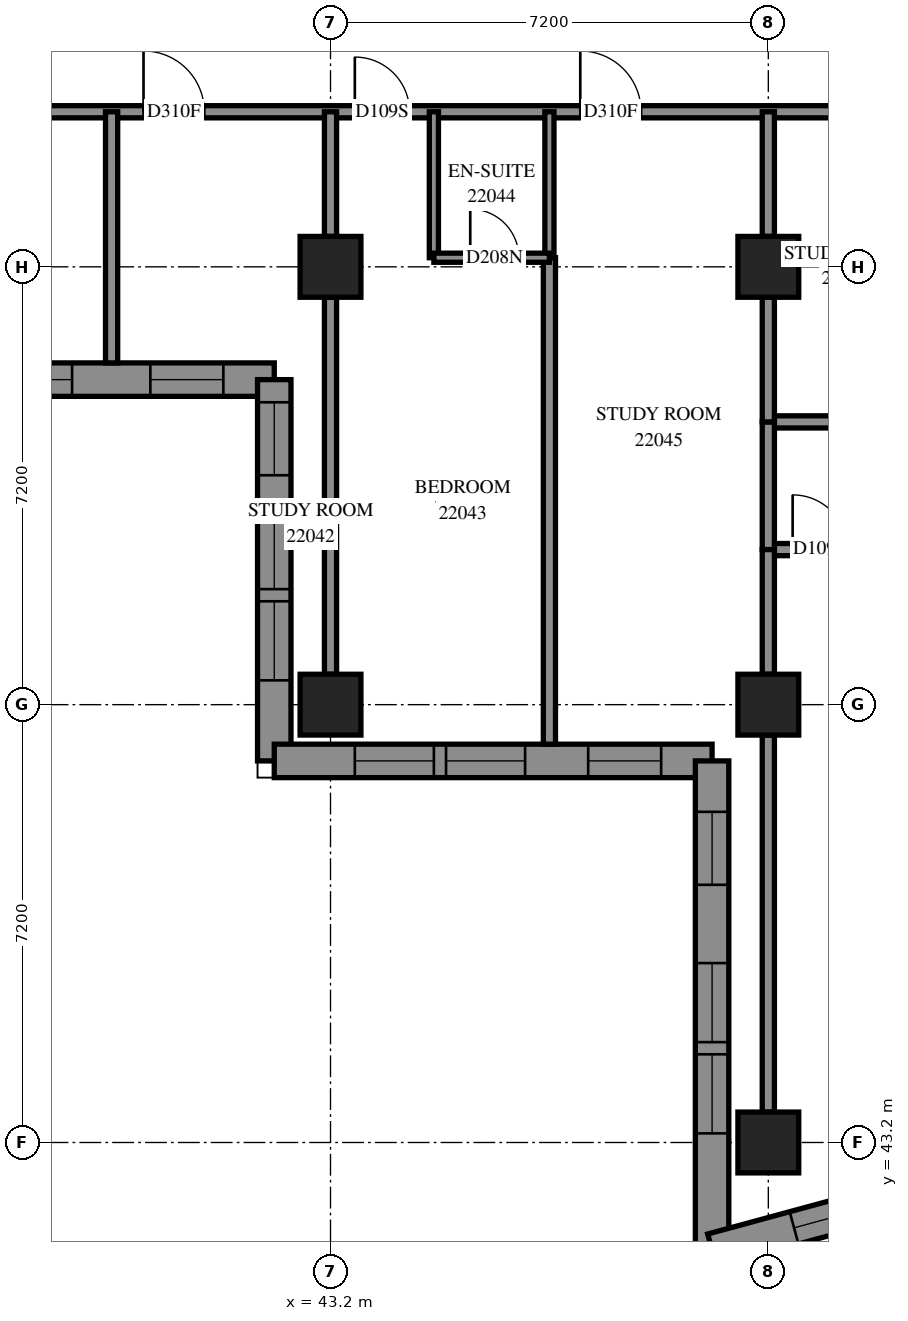
"""IFC4 building model, lengths in metres.
Left out: names, types, materials, properties, quantities, classifications, styles, units other than length and angle.
Written with IfcOpenShell. Run it as: python <this file> out.ifc"""

import sys

from ifc_helpers import new_model, si_unit, direction, frame, frame_2d, origin, origin_2d, place, context, subcontext, project, spatial, polyline, rectangle, outline, extrude, element, fill, save


model = new_model("IFC4")
c1 = context("Model", 3, precision=1e-05, world=origin(), true_north=direction((0.0, 1.0)))
c2 = subcontext(c1, "Body", "Model", "MODEL_VIEW")
j1 = project(units=[si_unit("LENGTHUNIT", "METRE"), si_unit("PLANEANGLEUNIT", "RADIAN")], contexts=[c1])
p1 = place(None, origin())
s1 = spatial("IfcSite", under=j1, at=p1, CompositionType="ELEMENT")
p2 = place(p1, origin())
s2 = spatial("IfcBuilding", under=s1, at=p2, CompositionType="ELEMENT")
p3 = place(p2, frame((0.0, 0.0, 84.6)))
s3 = spatial("IfcBuildingStorey", under=s2, at=p3, CompositionType="ELEMENT", Elevation=84.6)
for number, where, z_axis, x_axis in (
    (1, (43.2, 50.4, 0.0), (0.0, 0.0, 1.0), (1.0, 0.0, 0.0)),
    (2, (43.2, 57.6, 0.0), (0.0, 0.0, 1.0), (1.0, 0.0, 0.0)),
    (3, (50.4, 43.2, 0.0), (0.0, 0.0, 1.0), (1.0, 0.0, 0.0)),
    (4, (50.4, 50.4, 0.0), (0.0, 0.0, 1.0), (1.0, 0.0, 0.0)),
    (5, (50.4, 57.6, 0.0), (0.0, 0.0, 1.0), (1.0, 0.0, 0.0)),
):
    element("IfcColumn", number, at=place(p3, frame(where, z_axis=z_axis, x_axis=x_axis)), inside=s3, PredefinedType="COLUMN", context=c2, shape_type="SweptSolid", body=[
        extrude(rectangle(XDim=1.0, YDim=1.0, at=origin_2d()), origin(), (0.0, 0.0, 1.0), 3.1),
    ])
p4 = place(p3, frame((27.875, 55.745, 0.0), z_axis=(0.0, 0.0, 1.0), x_axis=(1.0, 0.0, 0.0)))
e6 = element("IfcWall", 6, at=p4, inside=s3, PredefinedType="SOLIDWALL", context=c2, shape_type="SweptSolid", body=[
    extrude(outline(polyline([(-0.275, -0.275), (14.125, -0.275), (14.675, 0.275), (0.275, 0.275), (-0.275, -0.275)])), origin(), (0.0, 0.0, 1.0), 3.1),
])
p5 = place(p4, frame((1.175, 0.0, 0.5)))
e7 = element("IfcOpeningElement", 7, at=p5, cuts=e6, PredefinedType="OPENING", context=c2, shape_type="SweptSolid", body=[
    extrude(rectangle(XDim=1.3, YDim=2.45, at=frame_2d((0.65, 1.225))), frame((0.0, 0.285, 0.0), z_axis=(0.0, -1.0, 0.0), x_axis=(1.0, 0.0, 0.0)), (0.0, 0.0, 1.0), 0.57),
])
p6 = place(p4, frame((2.675, 0.0, 0.5)))
e8 = element("IfcOpeningElement", 8, at=p6, cuts=e6, PredefinedType="OPENING", context=c2, shape_type="SweptSolid", body=[
    extrude(rectangle(XDim=1.3, YDim=2.45, at=frame_2d((0.65, 1.225))), frame((0.0, 0.285, 0.0), z_axis=(0.0, -1.0, 0.0), x_axis=(1.0, 0.0, 0.0)), (0.0, 0.0, 1.0), 0.57),
])
p7 = place(p4, frame((4.925, 0.0, 0.5)))
e9 = element("IfcOpeningElement", 9, at=p7, cuts=e6, PredefinedType="OPENING", context=c2, shape_type="SweptSolid", body=[
    extrude(rectangle(XDim=1.3, YDim=2.45, at=frame_2d((0.65, 1.225))), frame((0.0, 0.285, 0.0), z_axis=(0.0, -1.0, 0.0), x_axis=(1.0, 0.0, 0.0)), (0.0, 0.0, 1.0), 0.57),
])
p8 = place(p4, frame((6.425, 0.0, 0.5)))
e10 = element("IfcOpeningElement", 10, at=p8, cuts=e6, PredefinedType="OPENING", context=c2, shape_type="SweptSolid", body=[
    extrude(rectangle(XDim=1.3, YDim=2.45, at=frame_2d((0.65, 1.225))), frame((0.0, 0.285, 0.0), z_axis=(0.0, -1.0, 0.0), x_axis=(1.0, 0.0, 0.0)), (0.0, 0.0, 1.0), 0.57),
])
p9 = place(p4, frame((8.275, 0.0, 0.5)))
e11 = element("IfcOpeningElement", 11, at=p9, cuts=e6, PredefinedType="OPENING", context=c2, shape_type="SweptSolid", body=[
    extrude(rectangle(XDim=1.3, YDim=2.45, at=frame_2d((0.65, 1.225))), frame((0.0, 0.285, 0.0), z_axis=(0.0, -1.0, 0.0), x_axis=(1.0, 0.0, 0.0)), (0.0, 0.0, 1.0), 0.57),
])
p10 = place(p4, frame((9.775, 0.0, 0.5)))
e12 = element("IfcOpeningElement", 12, at=p10, cuts=e6, PredefinedType="OPENING", context=c2, shape_type="SweptSolid", body=[
    extrude(rectangle(XDim=1.3, YDim=2.45, at=frame_2d((0.65, 1.225))), frame((0.0, 0.285, 0.0), z_axis=(0.0, -1.0, 0.0), x_axis=(1.0, 0.0, 0.0)), (0.0, 0.0, 1.0), 0.57),
])
p11 = place(p4, frame((12.363, 0.0, 0.5)))
e13 = element("IfcOpeningElement", 13, at=p11, cuts=e6, PredefinedType="OPENING", context=c2, shape_type="SweptSolid", body=[
    extrude(rectangle(XDim=1.2, YDim=2.45, at=frame_2d((0.6, 1.225))), frame((0.0, 0.285, 0.0), z_axis=(0.0, -1.0, 0.0), x_axis=(1.0, 0.0, 0.0)), (0.0, 0.0, 1.0), 0.57),
])
p12 = place(p3, frame((42.275, 55.745, 0.0), z_axis=(0.0, 0.0, 1.0), x_axis=(0.0, -1.0, 0.0)))
e14 = element("IfcWall", 14, at=p12, inside=s3, PredefinedType="SOLIDWALL", context=c2, shape_type="SweptSolid", body=[
    extrude(outline(polyline([(0.275, -0.275), (6.545, -0.275), (5.995, 0.275), (-0.275, 0.275), (0.275, -0.275)])), origin(), (0.0, 0.0, 1.0), 3.1),
])
p13 = place(p12, frame((2.145, 0.0, 0.5)))
e15 = element("IfcOpeningElement", 15, at=p13, cuts=e14, PredefinedType="OPENING", context=c2, shape_type="SweptSolid", body=[
    extrude(rectangle(XDim=1.3, YDim=2.45, at=frame_2d((0.65, 1.225))), frame((0.0, 0.285, 0.0), z_axis=(0.0, -1.0, 0.0), x_axis=(1.0, 0.0, 0.0)), (0.0, 0.0, 1.0), 0.57),
])
p14 = place(p12, frame((3.645, 0.0, 0.5)))
e16 = element("IfcOpeningElement", 16, at=p14, cuts=e14, PredefinedType="OPENING", context=c2, shape_type="SweptSolid", body=[
    extrude(rectangle(XDim=1.3, YDim=2.45, at=frame_2d((0.65, 1.225))), frame((0.0, 0.285, 0.0), z_axis=(0.0, -1.0, 0.0), x_axis=(1.0, 0.0, 0.0)), (0.0, 0.0, 1.0), 0.57),
])
p15 = place(p12, frame((0.372, 0.0, 0.5)))
e17 = element("IfcOpeningElement", 17, at=p15, cuts=e14, PredefinedType="OPENING", context=c2, shape_type="SweptSolid", body=[
    extrude(rectangle(XDim=1.2, YDim=2.45, at=frame_2d((0.6, 1.225))), frame((0.0, 0.285, 0.0), z_axis=(0.0, -1.0, 0.0), x_axis=(1.0, 0.0, 0.0)), (0.0, 0.0, 1.0), 0.57),
])
p16 = place(p3, frame((42.275, 49.475, 0.0), z_axis=(0.0, 0.0, 1.0), x_axis=(1.0, 0.0, 0.0)))
e18 = element("IfcWall", 18, at=p16, inside=s3, PredefinedType="SOLIDWALL", context=c2, shape_type="SweptSolid", body=[
    extrude(outline(polyline([(-0.275, -0.275), (6.925, -0.275), (7.475, 0.275), (0.275, 0.275), (-0.275, -0.275)])), origin(), (0.0, 0.0, 1.0), 3.1),
])
p17 = place(p16, frame((1.325, 0.0, 0.5)))
e19 = element("IfcOpeningElement", 19, at=p17, cuts=e18, PredefinedType="OPENING", context=c2, shape_type="SweptSolid", body=[
    extrude(rectangle(XDim=1.3, YDim=2.45, at=frame_2d((0.65, 1.225))), frame((0.0, 0.285, 0.0), z_axis=(0.0, -1.0, 0.0), x_axis=(1.0, 0.0, 0.0)), (0.0, 0.0, 1.0), 0.57),
])
p18 = place(p16, frame((2.825, 0.0, 0.5)))
e20 = element("IfcOpeningElement", 20, at=p18, cuts=e18, PredefinedType="OPENING", context=c2, shape_type="SweptSolid", body=[
    extrude(rectangle(XDim=1.3, YDim=2.45, at=frame_2d((0.65, 1.225))), frame((0.0, 0.285, 0.0), z_axis=(0.0, -1.0, 0.0), x_axis=(1.0, 0.0, 0.0)), (0.0, 0.0, 1.0), 0.57),
])
p19 = place(p16, frame((5.162, 0.0, 0.5)))
e21 = element("IfcOpeningElement", 21, at=p19, cuts=e18, PredefinedType="OPENING", context=c2, shape_type="SweptSolid", body=[
    extrude(rectangle(XDim=1.2, YDim=2.45, at=frame_2d((0.6, 1.225))), frame((0.0, 0.285, 0.0), z_axis=(0.0, -1.0, 0.0), x_axis=(1.0, 0.0, 0.0)), (0.0, 0.0, 1.0), 0.57),
])
p20 = place(p3, frame((49.475, 49.475, 0.0), z_axis=(0.0, 0.0, 1.0), x_axis=(0.0, -1.0, 0.0)))
e22 = element("IfcWall", 22, at=p20, inside=s3, PredefinedType="SOLIDWALL", context=c2, shape_type="SweptSolid", body=[
    extrude(outline(polyline([(0.275, -0.275), (8.405, -0.275), (7.686, 0.275), (-0.275, 0.275), (0.275, -0.275)])), origin(), (0.0, 0.0, 1.0), 3.1),
])
p21 = place(p20, frame((3.325, 0.0, 0.5)))
e23 = element("IfcOpeningElement", 23, at=p21, cuts=e22, PredefinedType="OPENING", context=c2, shape_type="SweptSolid", body=[
    extrude(rectangle(XDim=1.3, YDim=2.45, at=frame_2d((0.65, 1.225))), frame((0.0, 0.285, 0.0), z_axis=(0.0, -1.0, 0.0), x_axis=(1.0, 0.0, 0.0)), (0.0, 0.0, 1.0), 0.57),
])
p22 = place(p20, frame((4.825, 0.0, 0.5)))
e24 = element("IfcOpeningElement", 24, at=p22, cuts=e22, PredefinedType="OPENING", context=c2, shape_type="SweptSolid", body=[
    extrude(rectangle(XDim=1.3, YDim=2.45, at=frame_2d((0.65, 1.225))), frame((0.0, 0.285, 0.0), z_axis=(0.0, -1.0, 0.0), x_axis=(1.0, 0.0, 0.0)), (0.0, 0.0, 1.0), 0.57),
])
p23 = place(p20, frame((0.838, 0.0, 0.5)))
e25 = element("IfcOpeningElement", 25, at=p23, cuts=e22, PredefinedType="OPENING", context=c2, shape_type="SweptSolid", body=[
    extrude(rectangle(XDim=1.2, YDim=2.45, at=frame_2d((0.6, 1.225))), frame((0.0, 0.285, 0.0), z_axis=(0.0, -1.0, 0.0), x_axis=(1.0, 0.0, 0.0)), (0.0, 0.0, 1.0), 0.57),
])
p24 = place(p3, frame((49.475, 41.43, 0.0), z_axis=(0.0, 0.0, 1.0), x_axis=(0.9649788617, 0.262327651, 0.0)))
e26 = element("IfcWall", 26, at=p24, inside=s3, PredefinedType="SOLIDWALL", context=c2, shape_type="SweptSolid", body=[
    extrude(outline(polyline([(-0.36, -0.275), (3.186, -0.275), (3.286, 0.275), (0.36, 0.275), (-0.36, -0.275)])), origin(), (0.0, 0.0, 1.0), 3.1),
])
p25 = place(p24, frame((1.397, 0.0, 0.5)))
e27 = element("IfcOpeningElement", 27, at=p25, cuts=e26, PredefinedType="OPENING", context=c2, shape_type="SweptSolid", body=[
    extrude(rectangle(XDim=1.2, YDim=2.45, at=frame_2d((0.6, 1.225))), frame((0.0, 0.285, 0.0), z_axis=(0.0, -1.0, 0.0), x_axis=(1.0, 0.0, 0.0)), (0.0, 0.0, 1.0), 0.57),
])
p26 = place(p3, frame((28.8, 60.15, 0.0), z_axis=(0.0, 0.0, 1.0), x_axis=(1.0, 0.0, 0.0)))
e28 = element("IfcWall", 28, at=p26, inside=s3, PredefinedType="PARTITIONING", context=c2, shape_type="SweptSolid", body=[
    extrude(rectangle(XDim=24.15, YDim=0.2, at=frame_2d((12.075, 0.0))), origin(), (0.0, 0.0, 1.0), 3.1),
])
p27 = place(p26, frame((11.325, 0.0, 0.0)))
e29 = element("IfcOpeningElement", 29, at=p27, cuts=e28, PredefinedType="OPENING", context=c2, shape_type="SweptSolid", body=[
    extrude(rectangle(XDim=1.0, YDim=2.1, at=frame_2d((0.5, 1.05))), frame((0.0, 0.11, 0.0), z_axis=(0.0, -1.0, 0.0), x_axis=(1.0, 0.0, 0.0)), (0.0, 0.0, 1.0), 0.22),
])
p28 = place(p26, frame((14.8, 0.0, 0.0)))
e30 = element("IfcOpeningElement", 30, at=p28, cuts=e28, PredefinedType="OPENING", context=c2, shape_type="SweptSolid", body=[
    extrude(rectangle(XDim=0.9, YDim=2.1, at=frame_2d((0.45, 1.05))), frame((0.0, 0.11, 0.0), z_axis=(0.0, -1.0, 0.0), x_axis=(1.0, 0.0, 0.0)), (0.0, 0.0, 1.0), 0.22),
])
p29 = place(p26, frame((18.508, 0.0, 0.0)))
e31 = element("IfcOpeningElement", 31, at=p29, cuts=e28, PredefinedType="OPENING", context=c2, shape_type="SweptSolid", body=[
    extrude(rectangle(XDim=1.0, YDim=2.1, at=frame_2d((0.5, 1.05))), frame((0.0, 0.11, 0.0), z_axis=(0.0, -1.0, 0.0), x_axis=(1.0, 0.0, 0.0)), (0.0, 0.0, 1.0), 0.22),
])
p30 = place(p26, frame((22.882, 0.0, 0.0)))
e32 = element("IfcOpeningElement", 32, at=p30, cuts=e28, PredefinedType="OPENING", context=c2, shape_type="SweptSolid", body=[
    extrude(rectangle(XDim=1.0, YDim=2.1, at=frame_2d((0.5, 1.05))), frame((0.0, 0.11, 0.0), z_axis=(0.0, -1.0, 0.0), x_axis=(1.0, 0.0, 0.0)), (0.0, 0.0, 1.0), 0.22),
])
p31 = place(p3, frame((46.8, 49.75, 0.0), z_axis=(0.0, 0.0, 1.0), x_axis=(0.0, 1.0, 0.0)))
e33 = element("IfcWall", 33, at=p31, inside=s3, PredefinedType="PARTITIONING", context=c2, shape_type="SweptSolid", body=[
    extrude(rectangle(XDim=8.0, YDim=0.2, at=frame_2d((4.0, 0.0))), origin(), (0.0, 0.0, 1.0), 3.1),
])
for number, where, z_axis, x_axis in (
    (34, (43.2, 50.9, 0.0), (0.0, 0.0, 1.0), (0.0, 1.0, 0.0)),
    (35, (50.4, 43.7, 0.0), (0.0, 0.0, 1.0), (0.0, 1.0, 0.0)),
):
    element("IfcWall", number, at=place(p3, frame(where, z_axis=z_axis, x_axis=x_axis)), inside=s3, PredefinedType="PARTITIONING", context=c2, shape_type="SweptSolid", body=[
        extrude(rectangle(XDim=6.2, YDim=0.2, at=frame_2d((3.1, 0.0))), origin(), (0.0, 0.0, 1.0), 2.6),
    ])
p32 = place(p3, frame((50.4, 52.95, 0.0), z_axis=(0.0, 0.0, 1.0), x_axis=(1.0, 0.0, 0.0)))
e36 = element("IfcWall", 36, at=p32, inside=s3, PredefinedType="PARTITIONING", context=c2, shape_type="SweptSolid", body=[
    extrude(rectangle(XDim=4.9, YDim=0.2, at=frame_2d((2.45, 0.0))), origin(), (0.0, 0.0, 1.0), 3.1),
])
p33 = place(p32, frame((0.4, 0.0, 0.0)))
e37 = element("IfcOpeningElement", 37, at=p33, cuts=e36, PredefinedType="OPENING", context=c2, shape_type="SweptSolid", body=[
    extrude(rectangle(XDim=0.9, YDim=2.1, at=frame_2d((0.45, 1.05))), frame((0.0, 0.11, 0.0), z_axis=(0.0, -1.0, 0.0), x_axis=(1.0, 0.0, 0.0)), (0.0, 0.0, 1.0), 0.22),
])
p34 = place(p3, frame((39.6, 56.02, 0.0), z_axis=(0.0, 0.0, 1.0), x_axis=(0.0, 1.0, 0.0)))
e38 = element("IfcWall", 38, at=p34, inside=s3, PredefinedType="PARTITIONING", context=c2, shape_type="SweptSolid", body=[
    extrude(rectangle(XDim=4.13, YDim=0.2, at=frame_2d((2.065, 0.0))), origin(), (0.0, 0.0, 1.0), 3.1),
])
p35 = place(p3, frame((50.4, 55.05, 0.0), z_axis=(0.0, 0.0, 1.0), x_axis=(1.0, 0.0, 0.0)))
e39 = element("IfcWall", 39, at=p35, inside=s3, PredefinedType="PARTITIONING", context=c2, shape_type="SweptSolid", body=[
    extrude(rectangle(XDim=2.55, YDim=0.2, at=frame_2d((1.275, 0.0))), origin(), (0.0, 0.0, 1.0), 3.1),
])
for number, where, z_axis, x_axis in (
    (40, (44.9, 57.75, 0.0), (0.0, 0.0, 1.0), (0.0, 1.0, 0.0)),
    (41, (46.8, 57.75, 0.0), (0.0, 0.0, 1.0), (0.0, 1.0, 0.0)),
):
    element("IfcWall", number, at=place(p3, frame(where, z_axis=z_axis, x_axis=x_axis)), inside=s3, PredefinedType="PARTITIONING", context=c2, shape_type="SweptSolid", body=[
        extrude(rectangle(XDim=2.4, YDim=0.15, at=frame_2d((1.2, 0.0))), origin(), (0.0, 0.0, 1.0), 3.1),
    ])
p36 = place(p3, frame((50.4, 52.95, 0.0), z_axis=(0.0, 0.0, 1.0), x_axis=(0.0, 1.0, 0.0)))
e42 = element("IfcWall", 42, at=p36, inside=s3, PredefinedType="PARTITIONING", context=c2, shape_type="SweptSolid", body=[
    extrude(rectangle(XDim=2.1, YDim=0.2, at=frame_2d((1.05, 0.0))), origin(), (0.0, 0.0, 1.0), 3.1),
])
for number, where, z_axis, x_axis in (
    (43, (50.4, 50.9, 0.0), (0.0, 0.0, 1.0), (0.0, 1.0, 0.0)),
    (44, (50.4, 55.05, 0.0), (0.0, 0.0, 1.0), (0.0, 1.0, 0.0)),
    (45, (43.2, 58.1, 0.0), (0.0, 0.0, 1.0), (0.0, 1.0, 0.0)),
    (46, (50.4, 58.1, 0.0), (0.0, 0.0, 1.0), (0.0, 1.0, 0.0)),
):
    element("IfcWall", number, at=place(p3, frame(where, z_axis=z_axis, x_axis=x_axis)), inside=s3, PredefinedType="PARTITIONING", context=c2, shape_type="SweptSolid", body=[
        extrude(rectangle(XDim=2.05, YDim=0.2, at=frame_2d((1.025, 0.0))), origin(), (0.0, 0.0, 1.0), 3.1),
    ])
p37 = place(p3, frame((44.9, 57.75, 0.0), z_axis=(0.0, 0.0, 1.0), x_axis=(1.0, 0.0, 0.0)))
e47 = element("IfcWall", 47, at=p37, inside=s3, PredefinedType="PARTITIONING", context=c2, shape_type="SweptSolid", body=[
    extrude(rectangle(XDim=1.9, YDim=0.15, at=frame_2d((0.95, 0.0))), origin(), (0.0, 0.0, 1.0), 3.1),
])
p38 = place(p37, frame((0.598, 0.0, 0.0)))
e48 = element("IfcOpeningElement", 48, at=p38, cuts=e47, PredefinedType="OPENING", context=c2, shape_type="SweptSolid", body=[
    extrude(rectangle(XDim=0.8, YDim=2.1, at=frame_2d((0.4, 1.05))), frame((0.0, 0.085, 0.0), z_axis=(0.0, -1.0, 0.0), x_axis=(1.0, 0.0, 0.0)), (0.0, 0.0, 1.0), 0.17),
])
p39 = place(p10, origin())
e49 = element("IfcWindow", 49, at=p39, inside=s3, PartitioningType="SINGLE_PANEL", PredefinedType="WINDOW", context=c2, shape_type="SweptSolid", body=[
    extrude(rectangle(XDim=1.3, YDim=2.45, at=frame_2d((0.65, 1.225))), frame((0.0, 0.155, 0.0), z_axis=(0.0, -1.0, 0.0), x_axis=(1.0, 0.0, 0.0)), (0.0, 0.0, 1.0), 0.06),
])
fill(e12, e49)
p40 = place(p11, origin())
e50 = element("IfcWindow", 50, at=p40, inside=s3, PartitioningType="SINGLE_PANEL", PredefinedType="WINDOW", context=c2, shape_type="SweptSolid", body=[
    extrude(rectangle(XDim=1.2, YDim=2.45, at=frame_2d((0.6, 1.225))), frame((0.0, 0.155, 0.0), z_axis=(0.0, -1.0, 0.0), x_axis=(1.0, 0.0, 0.0)), (0.0, 0.0, 1.0), 0.06),
])
fill(e13, e50)
p41 = place(p13, origin())
e51 = element("IfcWindow", 51, at=p41, inside=s3, PartitioningType="SINGLE_PANEL", PredefinedType="WINDOW", context=c2, shape_type="SweptSolid", body=[
    extrude(rectangle(XDim=1.3, YDim=2.45, at=frame_2d((0.65, 1.225))), frame((0.0, 0.155, 0.0), z_axis=(0.0, -1.0, 0.0), x_axis=(1.0, 0.0, 0.0)), (0.0, 0.0, 1.0), 0.06),
])
fill(e15, e51)
p42 = place(p14, origin())
e52 = element("IfcWindow", 52, at=p42, inside=s3, PartitioningType="SINGLE_PANEL", PredefinedType="WINDOW", context=c2, shape_type="SweptSolid", body=[
    extrude(rectangle(XDim=1.3, YDim=2.45, at=frame_2d((0.65, 1.225))), frame((0.0, 0.155, 0.0), z_axis=(0.0, -1.0, 0.0), x_axis=(1.0, 0.0, 0.0)), (0.0, 0.0, 1.0), 0.06),
])
fill(e16, e52)
p43 = place(p15, origin())
e53 = element("IfcWindow", 53, at=p43, inside=s3, PartitioningType="SINGLE_PANEL", PredefinedType="WINDOW", context=c2, shape_type="SweptSolid", body=[
    extrude(rectangle(XDim=1.2, YDim=2.45, at=frame_2d((0.6, 1.225))), frame((0.0, 0.155, 0.0), z_axis=(0.0, -1.0, 0.0), x_axis=(1.0, 0.0, 0.0)), (0.0, 0.0, 1.0), 0.06),
])
fill(e17, e53)
p44 = place(p17, origin())
e54 = element("IfcWindow", 54, at=p44, inside=s3, PartitioningType="SINGLE_PANEL", PredefinedType="WINDOW", context=c2, shape_type="SweptSolid", body=[
    extrude(rectangle(XDim=1.3, YDim=2.45, at=frame_2d((0.65, 1.225))), frame((0.0, 0.155, 0.0), z_axis=(0.0, -1.0, 0.0), x_axis=(1.0, 0.0, 0.0)), (0.0, 0.0, 1.0), 0.06),
])
fill(e19, e54)
p45 = place(p18, origin())
e55 = element("IfcWindow", 55, at=p45, inside=s3, PartitioningType="SINGLE_PANEL", PredefinedType="WINDOW", context=c2, shape_type="SweptSolid", body=[
    extrude(rectangle(XDim=1.3, YDim=2.45, at=frame_2d((0.65, 1.225))), frame((0.0, 0.155, 0.0), z_axis=(0.0, -1.0, 0.0), x_axis=(1.0, 0.0, 0.0)), (0.0, 0.0, 1.0), 0.06),
])
fill(e20, e55)
p46 = place(p19, origin())
e56 = element("IfcWindow", 56, at=p46, inside=s3, PartitioningType="SINGLE_PANEL", PredefinedType="WINDOW", context=c2, shape_type="SweptSolid", body=[
    extrude(rectangle(XDim=1.2, YDim=2.45, at=frame_2d((0.6, 1.225))), frame((0.0, 0.155, 0.0), z_axis=(0.0, -1.0, 0.0), x_axis=(1.0, 0.0, 0.0)), (0.0, 0.0, 1.0), 0.06),
])
fill(e21, e56)
p47 = place(p21, origin())
e57 = element("IfcWindow", 57, at=p47, inside=s3, PartitioningType="SINGLE_PANEL", PredefinedType="WINDOW", context=c2, shape_type="SweptSolid", body=[
    extrude(rectangle(XDim=1.3, YDim=2.45, at=frame_2d((0.65, 1.225))), frame((0.0, 0.155, 0.0), z_axis=(0.0, -1.0, 0.0), x_axis=(1.0, 0.0, 0.0)), (0.0, 0.0, 1.0), 0.06),
])
fill(e23, e57)
p48 = place(p22, origin())
e58 = element("IfcWindow", 58, at=p48, inside=s3, PartitioningType="SINGLE_PANEL", PredefinedType="WINDOW", context=c2, shape_type="SweptSolid", body=[
    extrude(rectangle(XDim=1.3, YDim=2.45, at=frame_2d((0.65, 1.225))), frame((0.0, 0.155, 0.0), z_axis=(0.0, -1.0, 0.0), x_axis=(1.0, 0.0, 0.0)), (0.0, 0.0, 1.0), 0.06),
])
fill(e24, e58)
p49 = place(p23, origin())
e59 = element("IfcWindow", 59, at=p49, inside=s3, PartitioningType="SINGLE_PANEL", PredefinedType="WINDOW", context=c2, shape_type="SweptSolid", body=[
    extrude(rectangle(XDim=1.2, YDim=2.45, at=frame_2d((0.6, 1.225))), frame((0.0, 0.155, 0.0), z_axis=(0.0, -1.0, 0.0), x_axis=(1.0, 0.0, 0.0)), (0.0, 0.0, 1.0), 0.06),
])
fill(e25, e59)
p50 = place(p25, origin())
e60 = element("IfcWindow", 60, at=p50, inside=s3, PartitioningType="SINGLE_PANEL", PredefinedType="WINDOW", context=c2, shape_type="SweptSolid", body=[
    extrude(rectangle(XDim=1.2, YDim=2.45, at=frame_2d((0.6, 1.225))), frame((0.0, 0.155, 0.0), z_axis=(0.0, -1.0, 0.0), x_axis=(1.0, 0.0, 0.0)), (0.0, 0.0, 1.0), 0.06),
])
fill(e27, e60)
p51 = place(p27, origin())
e61 = element("IfcDoor", 61, at=p51, inside=s3, OperationType="SINGLE_SWING_RIGHT", PredefinedType="DOOR", context=c2, shape_type="SweptSolid", body=[
    extrude(rectangle(XDim=1.0, YDim=2.1, at=frame_2d((0.5, 1.05))), frame((0.0, 0.025, 0.0), z_axis=(0.0, -1.0, 0.0), x_axis=(1.0, 0.0, 0.0)), (0.0, 0.0, 1.0), 0.05),
])
fill(e29, e61)
p52 = place(p28, origin())
e62 = element("IfcDoor", 62, at=p52, inside=s3, OperationType="SINGLE_SWING_LEFT", PredefinedType="DOOR", context=c2, shape_type="SweptSolid", body=[
    extrude(rectangle(XDim=0.9, YDim=2.1, at=frame_2d((0.45, 1.05))), frame((0.0, 0.025, 0.0), z_axis=(0.0, -1.0, 0.0), x_axis=(1.0, 0.0, 0.0)), (0.0, 0.0, 1.0), 0.05),
])
fill(e30, e62)
p53 = place(p38, origin())
e63 = element("IfcDoor", 63, at=p53, inside=s3, OperationType="SINGLE_SWING_RIGHT", PredefinedType="DOOR", context=c2, shape_type="SweptSolid", body=[
    extrude(rectangle(XDim=0.8, YDim=2.1, at=frame_2d((0.4, 1.05))), frame((0.0, 0.025, 0.0), z_axis=(0.0, -1.0, 0.0), x_axis=(1.0, 0.0, 0.0)), (0.0, 0.0, 1.0), 0.05),
])
fill(e48, e63)
p54 = place(p29, origin())
e64 = element("IfcDoor", 64, at=p54, inside=s3, OperationType="SINGLE_SWING_RIGHT", PredefinedType="DOOR", context=c2, shape_type="SweptSolid", body=[
    extrude(rectangle(XDim=1.0, YDim=2.1, at=frame_2d((0.5, 1.05))), frame((0.0, 0.025, 0.0), z_axis=(0.0, -1.0, 0.0), x_axis=(1.0, 0.0, 0.0)), (0.0, 0.0, 1.0), 0.05),
])
fill(e31, e64)
p55 = place(p33, origin())
e65 = element("IfcDoor", 65, at=p55, inside=s3, OperationType="SINGLE_SWING_LEFT", PredefinedType="DOOR", context=c2, shape_type="SweptSolid", body=[
    extrude(rectangle(XDim=0.9, YDim=2.1, at=frame_2d((0.45, 1.05))), frame((0.0, 0.025, 0.0), z_axis=(0.0, -1.0, 0.0), x_axis=(1.0, 0.0, 0.0)), (0.0, 0.0, 1.0), 0.05),
])
fill(e37, e65)
save(model, sys.argv[1])
